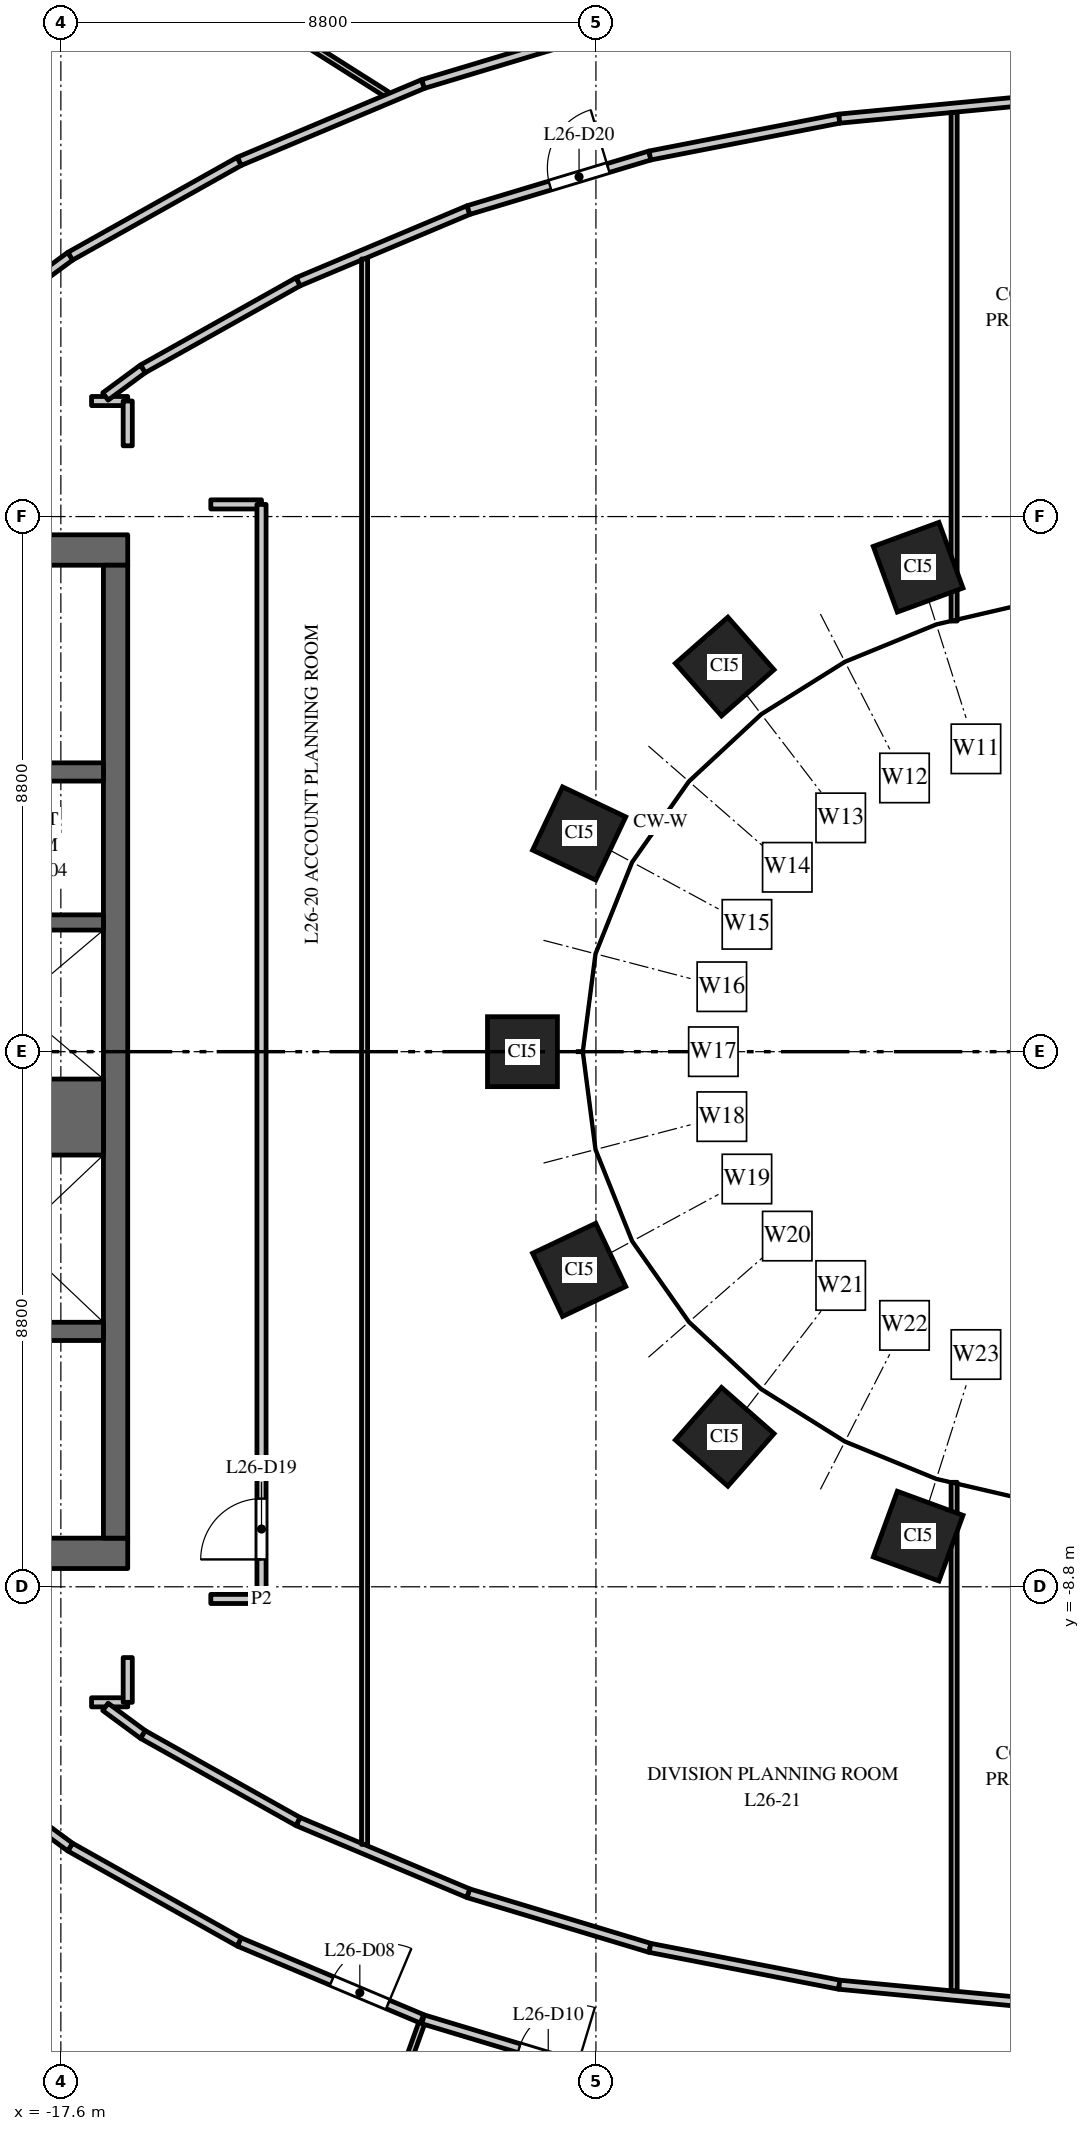
"""IFC4 building model, lengths in metres.
Left out: names, types, materials, properties, quantities, classifications, styles, units other than length and angle.
Written with IfcOpenShell. Run it as: python <this file> out.ifc"""

import sys

from ifc_helpers import new_model, si_unit, direction, frame, frame_2d, origin, origin_2d, place, context, subcontext, project, spatial, rectangle, extrude, element, fill, save


model = new_model("IFC4")
c1 = context("Model", 3, precision=1e-05, world=origin(), true_north=direction((0.0, 1.0)))
c2 = subcontext(c1, "Body", "Model", "MODEL_VIEW")
j1 = project(units=[si_unit("LENGTHUNIT", "METRE"), si_unit("PLANEANGLEUNIT", "RADIAN")], contexts=[c1])
p1 = place(None, origin())
s1 = spatial("IfcSite", under=j1, at=p1, CompositionType="ELEMENT")
p2 = place(p1, origin())
s2 = spatial("IfcBuilding", under=s1, at=p2, CompositionType="ELEMENT")
p3 = place(p2, frame((0.0, 0.0, 116.0)))
s3 = spatial("IfcBuildingStorey", under=s2, at=p3, CompositionType="ELEMENT", Elevation=116.0)
for number, where, z_axis, x_axis in (
    (1, (-3.501, 7.967, 0.0), (0.0, 0.0, 1.0), (-0.939, -0.344, 0.0)),
    (2, (-6.682, 6.334, 0.0), (0.0, 0.0, 1.0), (-0.751, -0.66, 0.0)),
    (3, (-9.076, 3.588, 0.0), (0.0, 0.0, 1.0), (-0.429, -0.903, 0.0)),
    (4, (-10.008, 0.0, 0.0), (0.0, 0.0, 1.0), (0.0, -1.0, 0.0)),
    (5, (-9.076, -3.588, 0.0), (0.0, 0.0, 1.0), (0.429, -0.903, 0.0)),
    (6, (-6.682, -6.334, 0.0), (0.0, 0.0, 1.0), (0.751, -0.66, 0.0)),
    (7, (-3.501, -7.967, 0.0), (0.0, 0.0, 1.0), (0.939, -0.344, 0.0)),
):
    element("IfcColumn", number, at=place(p3, frame(where, z_axis=z_axis, x_axis=x_axis)), inside=s3, PredefinedType="COLUMN", context=c2, shape_type="SweptSolid", body=[
        extrude(rectangle(XDim=1.15, YDim=1.15, at=origin_2d()), origin(), (0.0, 0.0, 1.0), 4.0),
    ])
p4 = place(p3, frame((-16.5, 8.25, 0.0), z_axis=(0.0, 0.0, 1.0), x_axis=(-1.0, 0.0, 0.0)))
e8 = element("IfcWall", 8, at=p4, inside=s3, PredefinedType="SHEAR", context=c2, shape_type="SweptSolid", body=[
    extrude(rectangle(XDim=15.0, YDim=0.5, at=frame_2d((7.5, 0.0))), origin(), (0.0, 0.0, 1.0), 3.7),
])
p5 = place(p4, frame((6.9, 0.0, 0.0)))
e9 = element("IfcOpeningElement", 9, at=p5, cuts=e8, PredefinedType="OPENING", context=c2, shape_type="SweptSolid", body=[
    extrude(rectangle(XDim=1.2, YDim=2.1, at=frame_2d((0.6, 1.05))), frame((0.0, 0.26, 0.0), z_axis=(0.0, -1.0, 0.0), x_axis=(1.0, 0.0, 0.0)), (0.0, 0.0, 1.0), 0.52),
])
p6 = place(p4, frame((12.425, 0.0, 0.0)))
e10 = element("IfcOpeningElement", 10, at=p6, cuts=e8, PredefinedType="OPENING", context=c2, shape_type="SweptSolid", body=[
    extrude(rectangle(XDim=0.9, YDim=2.1, at=frame_2d((0.45, 1.05))), frame((0.0, 0.26, 0.0), z_axis=(0.0, -1.0, 0.0), x_axis=(1.0, 0.0, 0.0)), (0.0, 0.0, 1.0), 0.52),
])
p7 = place(p3, frame((-16.5, -8.25, 0.0), z_axis=(0.0, 0.0, 1.0), x_axis=(-1.0, 0.0, 0.0)))
e11 = element("IfcWall", 11, at=p7, inside=s3, PredefinedType="SHEAR", context=c2, shape_type="SweptSolid", body=[
    extrude(rectangle(XDim=15.0, YDim=0.5, at=frame_2d((7.5, 0.0))), origin(), (0.0, 0.0, 1.0), 3.7),
])
p8 = place(p7, frame((6.9, 0.0, 0.0)))
e12 = element("IfcOpeningElement", 12, at=p8, cuts=e11, PredefinedType="OPENING", context=c2, shape_type="SweptSolid", body=[
    extrude(rectangle(XDim=1.2, YDim=2.1, at=frame_2d((0.6, 1.05))), frame((0.0, 0.26, 0.0), z_axis=(0.0, -1.0, 0.0), x_axis=(1.0, 0.0, 0.0)), (0.0, 0.0, 1.0), 0.52),
])
p9 = place(p7, frame((12.275, 0.0, 0.0)))
e13 = element("IfcOpeningElement", 13, at=p9, cuts=e11, PredefinedType="OPENING", context=c2, shape_type="SweptSolid", body=[
    extrude(rectangle(XDim=0.9, YDim=2.1, at=frame_2d((0.45, 1.05))), frame((0.0, 0.26, 0.0), z_axis=(0.0, -1.0, 0.0), x_axis=(1.0, 0.0, 0.0)), (0.0, 0.0, 1.0), 0.52),
])
p10 = place(p3, frame((-16.7, -8.0, 0.0), z_axis=(0.0, 0.0, 1.0), x_axis=(0.0, 1.0, 0.0)))
e14 = element("IfcWall", 14, at=p10, inside=s3, PredefinedType="SHEAR", context=c2, shape_type="SweptSolid", body=[
    extrude(rectangle(XDim=16.0, YDim=0.4, at=frame_2d((8.0, 0.0))), origin(), (0.0, 0.0, 1.0), 3.7),
])
p11 = place(p3, frame((-16.9, -1.075, 0.0), z_axis=(0.0, 0.0, 1.0), x_axis=(-1.0, 0.0, 0.0)))
e15 = element("IfcWall", 15, at=p11, inside=s3, PredefinedType="SHEAR", context=c2, shape_type="SweptSolid", body=[
    extrude(rectangle(XDim=2.9, YDim=1.25, at=frame_2d((1.45, 0.0))), origin(), (0.0, 0.0, 1.0), 3.7),
])
p12 = place(p3, frame((-16.9, 2.125, 0.0), z_axis=(0.0, 0.0, 1.0), x_axis=(-1.0, 0.0, 0.0)))
e16 = element("IfcWall", 16, at=p12, inside=s3, PredefinedType="SHEAR", context=c2, shape_type="SweptSolid", body=[
    extrude(rectangle(XDim=2.9, YDim=0.25, at=frame_2d((1.45, 0.0))), origin(), (0.0, 0.0, 1.0), 3.7),
])
p13 = place(p3, frame((-16.9, 4.6, 0.0), z_axis=(0.0, 0.0, 1.0), x_axis=(-1.0, 0.0, 0.0)))
e17 = element("IfcWall", 17, at=p13, inside=s3, PredefinedType="SHEAR", context=c2, shape_type="SweptSolid", body=[
    extrude(rectangle(XDim=6.18, YDim=0.3, at=frame_2d((3.09, 0.0))), origin(), (0.0, 0.0, 1.0), 3.7),
])
p14 = place(p13, frame((4.9, 0.0, 0.0)))
e18 = element("IfcOpeningElement", 18, at=p14, cuts=e17, PredefinedType="OPENING", context=c2, shape_type="SweptSolid", body=[
    extrude(rectangle(XDim=1.1, YDim=2.1, at=frame_2d((0.55, 1.05))), frame((0.0, 0.16, 0.0), z_axis=(0.0, -1.0, 0.0), x_axis=(1.0, 0.0, 0.0)), (0.0, 0.0, 1.0), 0.32),
])
p15 = place(p3, frame((-16.9, -4.6, 0.0), z_axis=(0.0, 0.0, 1.0), x_axis=(-1.0, 0.0, 0.0)))
e19 = element("IfcWall", 19, at=p15, inside=s3, PredefinedType="SHEAR", context=c2, shape_type="SweptSolid", body=[
    extrude(rectangle(XDim=6.18, YDim=0.3, at=frame_2d((3.09, 0.0))), origin(), (0.0, 0.0, 1.0), 3.7),
])
p16 = place(p15, frame((4.9, 0.0, 0.0)))
e20 = element("IfcOpeningElement", 20, at=p16, cuts=e19, PredefinedType="OPENING", context=c2, shape_type="SweptSolid", body=[
    extrude(rectangle(XDim=1.1, YDim=2.1, at=frame_2d((0.55, 1.05))), frame((0.0, 0.16, 0.0), z_axis=(0.0, -1.0, 0.0), x_axis=(1.0, 0.0, 0.0)), (0.0, 0.0, 1.0), 0.32),
])
p17 = place(p3, frame((-19.919, 11.26, 0.0), z_axis=(0.0, 0.0, 1.0), x_axis=(0.805185638843, 0.593022838516, 0.0)))
e21 = element("IfcWall", 21, at=p17, inside=s3, PredefinedType="PARTITIONING", context=c2, shape_type="SweptSolid", body=[
    extrude(rectangle(XDim=3.073, YDim=0.15, at=frame_2d((1.536, 0.0))), origin(), (0.0, 0.0, 1.0), 2.75),
])
p18 = place(p3, frame((-19.903, -11.272, 0.0), z_axis=(0.0, 0.0, 1.0), x_axis=(0.805228684186, -0.592964388613, 0.0)))
e22 = element("IfcWall", 22, at=p18, inside=s3, PredefinedType="PARTITIONING", context=c2, shape_type="SweptSolid", body=[
    extrude(rectangle(XDim=3.052, YDim=0.15, at=frame_2d((1.526, 0.0))), origin(), (0.0, 0.0, 1.0), 2.75),
])
for number, where, z_axis, x_axis in (
    (23, (-17.445, -13.082, 0.0), (0.0, 0.0, 1.0), (0.872, -0.489, 0.0)),
    (24, (-17.445, 13.082, 0.0), (0.0, 0.0, 1.0), (0.872, 0.489, 0.0)),
):
    element("IfcWall", number, at=place(p3, frame(where, z_axis=z_axis, x_axis=x_axis)), inside=s3, PredefinedType="PARTITIONING", context=c2, shape_type="SweptSolid", body=[
        extrude(rectangle(XDim=3.188, YDim=0.15, at=frame_2d((1.594, 0.0))), origin(), (0.0, 0.0, 1.0), 3.7),
    ])
p19 = place(p3, frame((-17.027, 18.777, 0.0), z_axis=(0.0, 0.0, 1.0), x_axis=(0.844786602714, -0.535103350648, 0.0)))
e25 = element("IfcWall", 25, at=p19, inside=s3, PredefinedType="PARTITIONING", context=c2, shape_type="SweptSolid", body=[
    extrude(rectangle(XDim=5.664, YDim=0.1, at=frame_2d((2.832, 0.0))), origin(), (0.0, 0.0, 1.0), 2.85),
])
p20 = place(p3, frame((-17.095, -10.7, 0.0), z_axis=(0.0, 0.0, 1.0), x_axis=(1.0, 0.0, 0.0)))
e26 = element("IfcWall", 26, at=p20, inside=s3, PredefinedType="PARTITIONING", context=c2, shape_type="SweptSolid", body=[
    extrude(rectangle(XDim=0.595, YDim=0.15, at=frame_2d((0.297, 0.0))), origin(), (0.0, 0.0, 1.0), 3.7),
])
p21 = place(p3, frame((-16.867, -10.775, 0.0), z_axis=(0.0, 0.0, 1.0), x_axis=(0.804751563869, -0.593611759023, 0.0)))
e27 = element("IfcWall", 27, at=p21, inside=s3, PredefinedType="PARTITIONING", context=c2, shape_type="SweptSolid", body=[
    extrude(rectangle(XDim=0.767, YDim=0.15, at=frame_2d((0.383, 0.0))), origin(), (0.0, 0.0, 1.0), 3.7),
])
p22 = place(p3, frame((-17.095, 10.7, 0.0), z_axis=(0.0, 0.0, 1.0), x_axis=(1.0, 0.0, 0.0)))
e28 = element("IfcWall", 28, at=p22, inside=s3, PredefinedType="PARTITIONING", context=c2, shape_type="SweptSolid", body=[
    extrude(rectangle(XDim=0.595, YDim=0.15, at=frame_2d((0.297, 0.0))), origin(), (0.0, 0.0, 1.0), 3.7),
])
p23 = place(p3, frame((-16.867, 10.775, 0.0), z_axis=(0.0, 0.0, 1.0), x_axis=(0.804751563869, 0.593611759023, 0.0)))
e29 = element("IfcWall", 29, at=p23, inside=s3, PredefinedType="PARTITIONING", context=c2, shape_type="SweptSolid", body=[
    extrude(rectangle(XDim=0.767, YDim=0.15, at=frame_2d((0.383, 0.0))), origin(), (0.0, 0.0, 1.0), 3.7),
])
for number, where, z_axis, x_axis in (
    (30, (-16.5, -10.7, 0.0), (0.0, 0.0, 1.0), (0.0, 1.0, 0.0)),
    (31, (-16.5, 9.964, 0.0), (0.0, 0.0, 1.0), (0.0, 1.0, 0.0)),
):
    element("IfcWall", number, at=place(p3, frame(where, z_axis=z_axis, x_axis=x_axis)), inside=s3, PredefinedType="PARTITIONING", context=c2, shape_type="SweptSolid", body=[
        extrude(rectangle(XDim=0.736, YDim=0.15, at=frame_2d((0.368, 0.0))), origin(), (0.0, 0.0, 1.0), 3.7),
    ])
for number, where, z_axis, x_axis in (
    (32, (-16.25, -11.23, 0.0), (0.0, 0.0, 1.0), (0.872, -0.489, 0.0)),
    (33, (-16.25, 11.23, 0.0), (0.0, 0.0, 1.0), (0.872, 0.489, 0.0)),
):
    element("IfcWall", number, at=place(p3, frame(where, z_axis=z_axis, x_axis=x_axis)), inside=s3, PredefinedType="PARTITIONING", context=c2, shape_type="SweptSolid", body=[
        extrude(rectangle(XDim=2.927, YDim=0.15, at=frame_2d((1.464, 0.0))), origin(), (0.0, 0.0, 1.0), 2.75),
    ])
for number, where, z_axis, x_axis in (
    (34, (-15.134, -9.0, 0.0), (0.0, 0.0, 1.0), (1.0, 0.0, 0.0)),
    (35, (-15.134, 9.0, 0.0), (0.0, 0.0, 1.0), (1.0, 0.0, 0.0)),
):
    element("IfcWall", number, at=place(p3, frame(where, z_axis=z_axis, x_axis=x_axis)), inside=s3, PredefinedType="PARTITIONING", context=c2, shape_type="SweptSolid", body=[
        extrude(rectangle(XDim=0.834, YDim=0.15, at=frame_2d((0.417, 0.0))), origin(), (0.0, 0.0, 1.0), 3.7),
    ])
p24 = place(p3, frame((-15.048, -25.383, 0.0), z_axis=(0.0, 0.0, 1.0), x_axis=(0.338391154788, 0.941005540027, 0.0)))
e36 = element("IfcWall", 36, at=p24, inside=s3, PredefinedType="PARTITIONING", context=c2, shape_type="SweptSolid", body=[
    extrude(rectangle(XDim=10.06, YDim=0.1, at=frame_2d((5.03, 0.0))), origin(), (0.0, 0.0, 1.0), 2.9),
])
p25 = place(p3, frame((-14.665, -14.642, 0.0), z_axis=(0.0, 0.0, 1.0), x_axis=(0.921850993012, -0.387544509293, 0.0)))
e37 = element("IfcWall", 37, at=p25, inside=s3, PredefinedType="PARTITIONING", context=c2, shape_type="SweptSolid", body=[
    extrude(rectangle(XDim=3.259, YDim=0.15, at=frame_2d((1.629, 0.0))), origin(), (0.0, 0.0, 1.0), 2.85),
])
p26 = place(p25, frame((1.65, 0.0, 0.0)))
e38 = element("IfcOpeningElement", 38, at=p26, cuts=e37, PredefinedType="OPENING", context=c2, shape_type="SweptSolid", body=[
    extrude(rectangle(XDim=1.0, YDim=2.1, at=frame_2d((0.5, 1.05))), frame((0.0, 0.085, 0.0), z_axis=(0.0, -1.0, 0.0), x_axis=(1.0, 0.0, 0.0)), (0.0, 0.0, 1.0), 0.17),
])
p27 = place(p3, frame((-14.665, 14.642, 0.0), z_axis=(0.0, 0.0, 1.0), x_axis=(0.921789499058, 0.38769075231, 0.0)))
e39 = element("IfcWall", 39, at=p27, inside=s3, PredefinedType="PARTITIONING", context=c2, shape_type="SweptSolid", body=[
    extrude(rectangle(XDim=3.278, YDim=0.15, at=frame_2d((1.639, 0.0))), origin(), (0.0, 0.0, 1.0), 2.85),
])
p28 = place(p3, frame((-14.3, -9.0, 0.0), z_axis=(0.0, 0.0, 1.0), x_axis=(0.0, 1.0, 0.0)))
e40 = element("IfcWall", 40, at=p28, inside=s3, PredefinedType="PARTITIONING", context=c2, shape_type="SweptSolid", body=[
    extrude(rectangle(XDim=18.0, YDim=0.15, at=frame_2d((9.0, 0.0))), origin(), (0.0, 0.0, 1.0), 3.7),
])
p29 = place(p28, frame((0.65, 0.0, 0.0)))
e41 = element("IfcOpeningElement", 41, at=p29, cuts=e40, PredefinedType="OPENING", context=c2, shape_type="SweptSolid", body=[
    extrude(rectangle(XDim=1.0, YDim=2.1, at=frame_2d((0.5, 1.05))), frame((0.0, 0.085, 0.0), z_axis=(0.0, -1.0, 0.0), x_axis=(1.0, 0.0, 0.0)), (0.0, 0.0, 1.0), 0.17),
])
for number, where, z_axis, x_axis in (
    (42, (-13.697, -12.662, 0.0), (0.0, 0.0, 1.0), (0.922, -0.388, 0.0)),
    (43, (-13.697, 12.662, 0.0), (0.0, 0.0, 1.0), (0.922, 0.388, 0.0)),
):
    element("IfcWall", number, at=place(p3, frame(where, z_axis=z_axis, x_axis=x_axis)), inside=s3, PredefinedType="PARTITIONING", context=c2, shape_type="SweptSolid", body=[
        extrude(rectangle(XDim=3.038, YDim=0.15, at=frame_2d((1.519, 0.0))), origin(), (0.0, 0.0, 1.0), 2.85),
    ])
p30 = place(p3, frame((-12.605, -13.036, 0.0), z_axis=(0.0, 0.0, 1.0), x_axis=(0.0, 1.0, 0.0)))
e44 = element("IfcWall", 44, at=p30, inside=s3, PredefinedType="PARTITIONING", context=c2, shape_type="SweptSolid", body=[
    extrude(rectangle(XDim=26.072, YDim=0.1, at=frame_2d((13.036, 0.0))), origin(), (0.0, 0.0, 1.0), 2.75),
])
p31 = place(p3, frame((-11.643, -15.913, 0.0), z_axis=(0.0, 0.0, 1.0), x_axis=(0.957584891346, -0.288151307243, 0.0)))
e45 = element("IfcWall", 45, at=p31, inside=s3, PredefinedType="PARTITIONING", context=c2, shape_type="SweptSolid", body=[
    extrude(rectangle(XDim=3.345, YDim=0.15, at=frame_2d((1.672, 0.0))), origin(), (0.0, 0.0, 1.0), 3.7),
])
p32 = place(p31, frame((1.65, 0.0, 0.0)))
e46 = element("IfcOpeningElement", 46, at=p32, cuts=e45, PredefinedType="OPENING", context=c2, shape_type="SweptSolid", body=[
    extrude(rectangle(XDim=1.0, YDim=2.1, at=frame_2d((0.5, 1.05))), frame((0.0, 0.085, 0.0), z_axis=(0.0, -1.0, 0.0), x_axis=(1.0, 0.0, 0.0)), (0.0, 0.0, 1.0), 0.17),
])
p33 = place(p3, frame((-11.643, 15.913, 0.0), z_axis=(0.0, 0.0, 1.0), x_axis=(0.957584891346, 0.288151307243, 0.0)))
e47 = element("IfcWall", 47, at=p33, inside=s3, PredefinedType="PARTITIONING", context=c2, shape_type="SweptSolid", body=[
    extrude(rectangle(XDim=3.345, YDim=0.15, at=frame_2d((1.672, 0.0))), origin(), (0.0, 0.0, 1.0), 3.7),
])
p34 = place(p3, frame((-10.897, -13.84, 0.0), z_axis=(0.0, 0.0, 1.0), x_axis=(0.957606118849, -0.28808075455, 0.0)))
e48 = element("IfcWall", 48, at=p34, inside=s3, PredefinedType="PARTITIONING", context=c2, shape_type="SweptSolid", body=[
    extrude(rectangle(XDim=3.117, YDim=0.15, at=frame_2d((1.559, 0.0))), origin(), (0.0, 0.0, 1.0), 3.7),
])
p35 = place(p3, frame((-10.897, 13.84, 0.0), z_axis=(0.0, 0.0, 1.0), x_axis=(0.957606118849, 0.28808075455, 0.0)))
e49 = element("IfcWall", 49, at=p35, inside=s3, PredefinedType="PARTITIONING", context=c2, shape_type="SweptSolid", body=[
    extrude(rectangle(XDim=3.117, YDim=0.15, at=frame_2d((1.559, 0.0))), origin(), (0.0, 0.0, 1.0), 3.7),
])
p36 = place(p35, frame((1.4, 0.0, 0.0)))
e50 = element("IfcOpeningElement", 50, at=p36, cuts=e49, PredefinedType="OPENING", context=c2, shape_type="SweptSolid", body=[
    extrude(rectangle(XDim=1.0, YDim=2.1, at=frame_2d((0.5, 1.05))), frame((0.0, 0.085, 0.0), z_axis=(0.0, -1.0, 0.0), x_axis=(1.0, 0.0, 0.0)), (0.0, 0.0, 1.0), 0.17),
])
for number, where, z_axis, x_axis in (
    (51, (-7.912, -14.738, 0.0), (0.0, 0.0, 1.0), (0.982, -0.191, 0.0)),
    (52, (-7.912, 14.738, 0.0), (0.0, 0.0, 1.0), (0.982, 0.191, 0.0)),
):
    element("IfcWall", number, at=place(p3, frame(where, z_axis=z_axis, x_axis=x_axis)), inside=s3, PredefinedType="PARTITIONING", context=c2, shape_type="SweptSolid", body=[
        extrude(rectangle(XDim=3.172, YDim=0.15, at=frame_2d((1.586, 0.0))), origin(), (0.0, 0.0, 1.0), 2.85),
    ])
for number, where, z_axis, x_axis in (
    (53, (-4.798, -15.344, 0.0), (0.0, 0.0, 1.0), (0.995, -0.095, 0.0)),
    (54, (-4.798, 15.344, 0.0), (0.0, 0.0, 1.0), (0.995, 0.095, 0.0)),
):
    element("IfcWall", number, at=place(p3, frame(where, z_axis=z_axis, x_axis=x_axis)), inside=s3, PredefinedType="PARTITIONING", context=c2, shape_type="SweptSolid", body=[
        extrude(rectangle(XDim=3.205, YDim=0.15, at=frame_2d((1.602, 0.0))), origin(), (0.0, 0.0, 1.0), 3.7),
    ])
for number, where, z_axis, x_axis in (
    (55, (-2.909, -15.445, 0.0), (0.0, 0.0, 1.0), (0.0, 1.0, 0.0)),
    (56, (-2.909, 7.082, 0.0), (0.0, 0.0, 1.0), (0.0, 1.0, 0.0)),
):
    element("IfcWall", number, at=place(p3, frame(where, z_axis=z_axis, x_axis=x_axis)), inside=s3, PredefinedType="PARTITIONING", context=c2, shape_type="SweptSolid", body=[
        extrude(rectangle(XDim=8.363, YDim=0.1, at=frame_2d((4.182, 0.0))), origin(), (0.0, 0.0, 1.0), 2.9),
    ])
p37 = place(p26, origin())
e57 = element("IfcDoor", 57, at=p37, inside=s3, OperationType="SINGLE_SWING_RIGHT", PredefinedType="DOOR", context=c2, shape_type="SweptSolid", body=[
    extrude(rectangle(XDim=1.0, YDim=2.1, at=frame_2d((0.5, 1.05))), frame((0.0, 0.025, 0.0), z_axis=(0.0, -1.0, 0.0), x_axis=(1.0, 0.0, 0.0)), (0.0, 0.0, 1.0), 0.05),
])
fill(e38, e57)
p38 = place(p32, origin())
e58 = element("IfcDoor", 58, at=p38, inside=s3, OperationType="SINGLE_SWING_RIGHT", PredefinedType="DOOR", context=c2, shape_type="SweptSolid", body=[
    extrude(rectangle(XDim=1.0, YDim=2.1, at=frame_2d((0.5, 1.05))), frame((0.0, 0.025, 0.0), z_axis=(0.0, -1.0, 0.0), x_axis=(1.0, 0.0, 0.0)), (0.0, 0.0, 1.0), 0.05),
])
fill(e46, e58)
p39 = place(p29, origin())
e59 = element("IfcDoor", 59, at=p39, inside=s3, OperationType="SINGLE_SWING_LEFT", PredefinedType="DOOR", context=c2, shape_type="SweptSolid", body=[
    extrude(rectangle(XDim=1.0, YDim=2.1, at=frame_2d((0.5, 1.05))), frame((0.0, 0.025, 0.0), z_axis=(0.0, -1.0, 0.0), x_axis=(1.0, 0.0, 0.0)), (0.0, 0.0, 1.0), 0.05),
])
fill(e41, e59)
p40 = place(p36, origin())
e60 = element("IfcDoor", 60, at=p40, inside=s3, OperationType="SINGLE_SWING_RIGHT", PredefinedType="DOOR", context=c2, shape_type="SweptSolid", body=[
    extrude(rectangle(XDim=1.0, YDim=2.1, at=frame_2d((0.5, 1.05))), frame((0.0, 0.025, 0.0), z_axis=(0.0, -1.0, 0.0), x_axis=(1.0, 0.0, 0.0)), (0.0, 0.0, 1.0), 0.05),
])
fill(e50, e60)
save(model, sys.argv[1])
